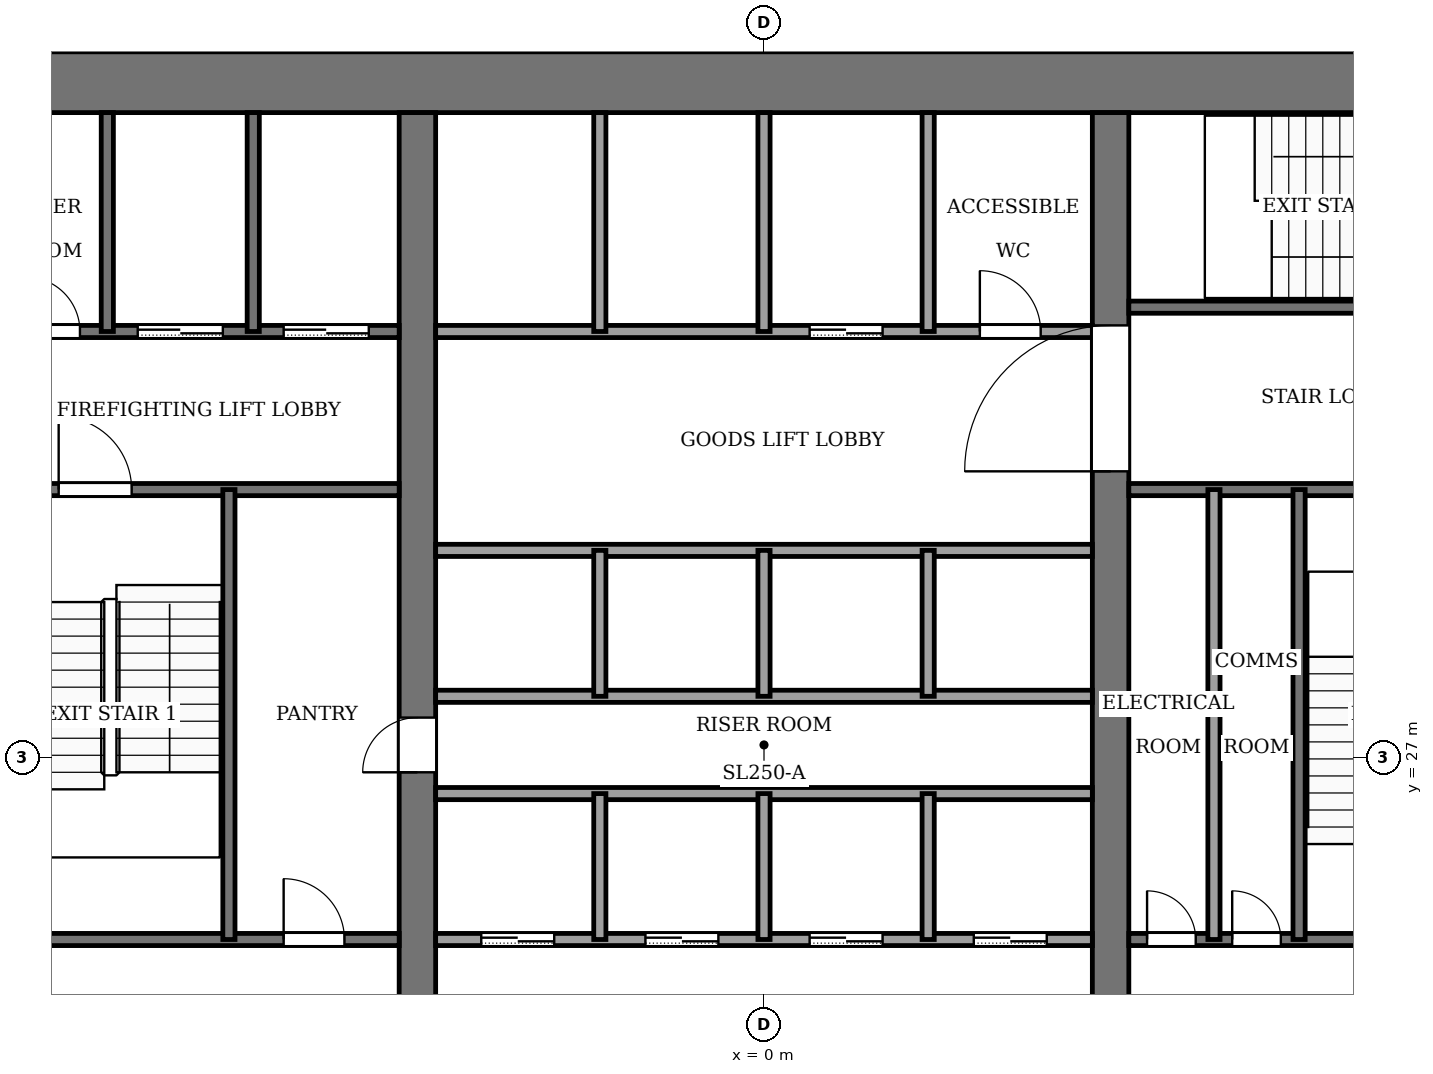
"""IFC4 building model, lengths in metres.
Left out: names, types, materials, properties, quantities, classifications, styles, units other than length and angle.
Written with IfcOpenShell. Run it as: python <this file> out.ifc"""

import sys

from ifc_helpers import new_model, si_unit, direction, frame, frame_2d, origin, place, context, subcontext, project, spatial, rectangle, extrude, element, fill, save


model = new_model("IFC4")
c1 = context("Model", 3, precision=1e-05, world=origin(), true_north=direction((0.0, 1.0)))
c2 = subcontext(c1, "Body", "Model", "MODEL_VIEW")
j1 = project(units=[si_unit("LENGTHUNIT", "METRE"), si_unit("PLANEANGLEUNIT", "RADIAN")], contexts=[c1])
p1 = place(None, origin())
s1 = spatial("IfcSite", under=j1, at=p1, CompositionType="ELEMENT")
p2 = place(p1, origin())
s2 = spatial("IfcBuilding", under=s1, at=p2, CompositionType="ELEMENT")
p3 = place(p2, frame((0.0, 0.0, 138.0)))
s3 = spatial("IfcBuildingStorey", under=s2, at=p3, CompositionType="ELEMENT", Elevation=138.0)
p4 = place(p3, frame((-13.6, 38.1, -0.13), z_axis=(0.0, 0.0, 1.0), x_axis=(1.0, 0.0, 0.0)))
e1 = element("IfcWall", 1, at=p4, inside=s3, PredefinedType="SHEAR", context=c2, shape_type="SweptSolid", body=[
    extrude(rectangle(XDim=27.2, YDim=1.0, at=frame_2d((13.6, 0.0))), origin(), (0.0, 0.0, 1.0), 4.0),
])
p5 = place(p3, frame((-5.7, 18.4, -0.13), z_axis=(0.0, 0.0, 1.0), x_axis=(0.0, 1.0, 0.0)))
e2 = element("IfcWall", 2, at=p5, inside=s3, PredefinedType="SHEAR", context=c2, shape_type="SweptSolid", body=[
    extrude(rectangle(XDim=19.2, YDim=0.6, at=frame_2d((9.6, 0.0))), origin(), (0.0, 0.0, 1.0), 4.0),
])
p6 = place(p5, frame((8.35, 0.0, 0.13)))
e3 = element("IfcOpeningElement", 3, at=p6, cuts=e2, PredefinedType="OPENING", context=c2, shape_type="SweptSolid", body=[
    extrude(rectangle(XDim=0.9, YDim=2.1, at=frame_2d((0.45, 1.05))), frame((0.0, 0.31, 0.0), z_axis=(0.0, -1.0, 0.0), x_axis=(1.0, 0.0, 0.0)), (0.0, 0.0, 1.0), 0.62),
])
p7 = place(p3, frame((5.7, 18.4, -0.13), z_axis=(0.0, 0.0, 1.0), x_axis=(0.0, 1.0, 0.0)))
e4 = element("IfcWall", 4, at=p7, inside=s3, PredefinedType="SHEAR", context=c2, shape_type="SweptSolid", body=[
    extrude(rectangle(XDim=19.2, YDim=0.6, at=frame_2d((9.6, 0.0))), origin(), (0.0, 0.0, 1.0), 4.0),
])
p8 = place(p7, frame((13.3, 0.0, 0.13)))
e5 = element("IfcOpeningElement", 5, at=p8, cuts=e4, PredefinedType="OPENING", context=c2, shape_type="SweptSolid", body=[
    extrude(rectangle(XDim=2.4, YDim=2.4, at=frame_2d((1.2, 1.2))), frame((0.0, 0.31, 0.0), z_axis=(0.0, -1.0, 0.0), x_axis=(1.0, 0.0, 0.0)), (0.0, 0.0, 1.0), 0.62),
])
p9 = place(p3, frame((-12.6, 24.0, 0.0), z_axis=(0.0, 0.0, 1.0), x_axis=(1.0, 0.0, 0.0)))
e6 = element("IfcWall", 6, at=p9, inside=s3, PredefinedType="PARTITIONING", context=c2, shape_type="SweptSolid", body=[
    extrude(rectangle(XDim=6.6, YDim=0.2, at=frame_2d((3.3, 0.0))), origin(), (0.0, 0.0, 1.0), 3.87),
])
p10 = place(p9, frame((4.7, 0.0, 0.0)))
e7 = element("IfcOpeningElement", 7, at=p10, cuts=e6, PredefinedType="OPENING", context=c2, shape_type="SweptSolid", body=[
    extrude(rectangle(XDim=1.0, YDim=2.1, at=frame_2d((0.5, 1.05))), frame((0.0, 0.11, 0.0), z_axis=(0.0, -1.0, 0.0), x_axis=(1.0, 0.0, 0.0)), (0.0, 0.0, 1.0), 0.22),
])
p11 = place(p3, frame((-5.4, 24.0, 0.0), z_axis=(0.0, 0.0, 1.0), x_axis=(1.0, 0.0, 0.0)))
e8 = element("IfcWall", 8, at=p11, inside=s3, PredefinedType="PARTITIONING", context=c2, shape_type="SweptSolid", body=[
    extrude(rectangle(XDim=10.8, YDim=0.2, at=frame_2d((5.4, 0.0))), origin(), (0.0, 0.0, 1.0), 3.87),
])
p12 = place(p11, frame((0.75, 0.0, 0.0)))
e9 = element("IfcOpeningElement", 9, at=p12, cuts=e8, PredefinedType="OPENING", context=c2, shape_type="SweptSolid", body=[
    extrude(rectangle(XDim=1.2, YDim=2.2, at=frame_2d((0.6, 1.1))), frame((0.0, 0.11, 0.0), z_axis=(0.0, -1.0, 0.0), x_axis=(1.0, 0.0, 0.0)), (0.0, 0.0, 1.0), 0.22),
])
p13 = place(p11, frame((3.45, 0.0, 0.0)))
e10 = element("IfcOpeningElement", 10, at=p13, cuts=e8, PredefinedType="OPENING", context=c2, shape_type="SweptSolid", body=[
    extrude(rectangle(XDim=1.2, YDim=2.2, at=frame_2d((0.6, 1.1))), frame((0.0, 0.11, 0.0), z_axis=(0.0, -1.0, 0.0), x_axis=(1.0, 0.0, 0.0)), (0.0, 0.0, 1.0), 0.22),
])
p14 = place(p11, frame((6.15, 0.0, 0.0)))
e11 = element("IfcOpeningElement", 11, at=p14, cuts=e8, PredefinedType="OPENING", context=c2, shape_type="SweptSolid", body=[
    extrude(rectangle(XDim=1.2, YDim=2.2, at=frame_2d((0.6, 1.1))), frame((0.0, 0.11, 0.0), z_axis=(0.0, -1.0, 0.0), x_axis=(1.0, 0.0, 0.0)), (0.0, 0.0, 1.0), 0.22),
])
p15 = place(p11, frame((8.85, 0.0, 0.0)))
e12 = element("IfcOpeningElement", 12, at=p15, cuts=e8, PredefinedType="OPENING", context=c2, shape_type="SweptSolid", body=[
    extrude(rectangle(XDim=1.2, YDim=2.2, at=frame_2d((0.6, 1.1))), frame((0.0, 0.11, 0.0), z_axis=(0.0, -1.0, 0.0), x_axis=(1.0, 0.0, 0.0)), (0.0, 0.0, 1.0), 0.22),
])
p16 = place(p3, frame((6.0, 24.0, 0.0), z_axis=(0.0, 0.0, 1.0), x_axis=(1.0, 0.0, 0.0)))
e13 = element("IfcWall", 13, at=p16, inside=s3, PredefinedType="PARTITIONING", context=c2, shape_type="SweptSolid", body=[
    extrude(rectangle(XDim=6.6, YDim=0.2, at=frame_2d((3.3, 0.0))), origin(), (0.0, 0.0, 1.0), 3.87),
])
p17 = place(p16, frame((0.3, 0.0, 0.0)))
e14 = element("IfcOpeningElement", 14, at=p17, cuts=e13, PredefinedType="OPENING", context=c2, shape_type="SweptSolid", body=[
    extrude(rectangle(XDim=0.8, YDim=2.1, at=frame_2d((0.4, 1.05))), frame((0.0, 0.11, 0.0), z_axis=(0.0, -1.0, 0.0), x_axis=(1.0, 0.0, 0.0)), (0.0, 0.0, 1.0), 0.22),
])
p18 = place(p16, frame((1.7, 0.0, 0.0)))
e15 = element("IfcOpeningElement", 15, at=p18, cuts=e13, PredefinedType="OPENING", context=c2, shape_type="SweptSolid", body=[
    extrude(rectangle(XDim=0.8, YDim=2.1, at=frame_2d((0.4, 1.05))), frame((0.0, 0.11, 0.0), z_axis=(0.0, -1.0, 0.0), x_axis=(1.0, 0.0, 0.0)), (0.0, 0.0, 1.0), 0.22),
])
p19 = place(p16, frame((4.4, 0.0, 0.0)))
e16 = element("IfcOpeningElement", 16, at=p19, cuts=e13, PredefinedType="OPENING", context=c2, shape_type="SweptSolid", body=[
    extrude(rectangle(XDim=1.2, YDim=2.2, at=frame_2d((0.6, 1.1))), frame((0.0, 0.11, 0.0), z_axis=(0.0, -1.0, 0.0), x_axis=(1.0, 0.0, 0.0)), (0.0, 0.0, 1.0), 0.22),
])
for number, where, z_axis, x_axis in (
    (17, (-5.4, 26.4, 0.0), (0.0, 0.0, 1.0), (1.0, 0.0, 0.0)),
    (18, (-5.4, 28.0, 0.0), (0.0, 0.0, 1.0), (1.0, 0.0, 0.0)),
    (19, (-5.4, 30.4, 0.0), (0.0, 0.0, 1.0), (1.0, 0.0, 0.0)),
):
    element("IfcWall", number, at=place(p3, frame(where, z_axis=z_axis, x_axis=x_axis)), inside=s3, PredefinedType="PARTITIONING", context=c2, shape_type="SweptSolid", body=[
        extrude(rectangle(XDim=10.8, YDim=0.2, at=frame_2d((5.4, 0.0))), origin(), (0.0, 0.0, 1.0), 3.87),
    ])
p20 = place(p3, frame((-12.6, 31.4, 0.0), z_axis=(0.0, 0.0, 1.0), x_axis=(1.0, 0.0, 0.0)))
e20 = element("IfcWall", 20, at=p20, inside=s3, PredefinedType="PARTITIONING", context=c2, shape_type="SweptSolid", body=[
    extrude(rectangle(XDim=6.6, YDim=0.2, at=frame_2d((3.3, 0.0))), origin(), (0.0, 0.0, 1.0), 3.87),
])
p21 = place(p20, frame((1.0, 0.0, 0.0)))
e21 = element("IfcOpeningElement", 21, at=p21, cuts=e20, PredefinedType="OPENING", context=c2, shape_type="SweptSolid", body=[
    extrude(rectangle(XDim=1.2, YDim=2.2, at=frame_2d((0.6, 1.1))), frame((0.0, 0.11, 0.0), z_axis=(0.0, -1.0, 0.0), x_axis=(1.0, 0.0, 0.0)), (0.0, 0.0, 1.0), 0.22),
])
p22 = place(p3, frame((6.0, 31.4, 0.0), z_axis=(0.0, 0.0, 1.0), x_axis=(1.0, 0.0, 0.0)))
e22 = element("IfcWall", 22, at=p22, inside=s3, PredefinedType="PARTITIONING", context=c2, shape_type="SweptSolid", body=[
    extrude(rectangle(XDim=6.6, YDim=0.2, at=frame_2d((3.3, 0.0))), origin(), (0.0, 0.0, 1.0), 3.87),
])
p23 = place(p3, frame((-12.6, 34.0, 0.0), z_axis=(0.0, 0.0, 1.0), x_axis=(1.0, 0.0, 0.0)))
e23 = element("IfcWall", 23, at=p23, inside=s3, PredefinedType="PARTITIONING", context=c2, shape_type="SweptSolid", body=[
    extrude(rectangle(XDim=6.6, YDim=0.2, at=frame_2d((3.3, 0.0))), origin(), (0.0, 0.0, 1.0), 3.87),
])
p24 = place(p23, frame((4.7, 0.0, 0.0)))
e24 = element("IfcOpeningElement", 24, at=p24, cuts=e23, PredefinedType="OPENING", context=c2, shape_type="SweptSolid", body=[
    extrude(rectangle(XDim=1.4, YDim=2.2, at=frame_2d((0.7, 1.1))), frame((0.0, 0.11, 0.0), z_axis=(0.0, -1.0, 0.0), x_axis=(1.0, 0.0, 0.0)), (0.0, 0.0, 1.0), 0.22),
])
p25 = place(p23, frame((2.3, 0.0, 0.0)))
e25 = element("IfcOpeningElement", 25, at=p25, cuts=e23, PredefinedType="OPENING", context=c2, shape_type="SweptSolid", body=[
    extrude(rectangle(XDim=1.4, YDim=2.2, at=frame_2d((0.7, 1.1))), frame((0.0, 0.11, 0.0), z_axis=(0.0, -1.0, 0.0), x_axis=(1.0, 0.0, 0.0)), (0.0, 0.0, 1.0), 0.22),
])
p26 = place(p23, frame((0.45, 0.0, 0.0)))
e26 = element("IfcOpeningElement", 26, at=p26, cuts=e23, PredefinedType="OPENING", context=c2, shape_type="SweptSolid", body=[
    extrude(rectangle(XDim=0.9, YDim=2.1, at=frame_2d((0.45, 1.05))), frame((0.0, 0.11, 0.0), z_axis=(0.0, -1.0, 0.0), x_axis=(1.0, 0.0, 0.0)), (0.0, 0.0, 1.0), 0.22),
])
p27 = place(p3, frame((-5.4, 34.0, 0.0), z_axis=(0.0, 0.0, 1.0), x_axis=(1.0, 0.0, 0.0)))
e27 = element("IfcWall", 27, at=p27, inside=s3, PredefinedType="PARTITIONING", context=c2, shape_type="SweptSolid", body=[
    extrude(rectangle(XDim=10.8, YDim=0.2, at=frame_2d((5.4, 0.0))), origin(), (0.0, 0.0, 1.0), 3.87),
])
p28 = place(p27, frame((6.15, 0.0, 0.0)))
e28 = element("IfcOpeningElement", 28, at=p28, cuts=e27, PredefinedType="OPENING", context=c2, shape_type="SweptSolid", body=[
    extrude(rectangle(XDim=1.2, YDim=2.2, at=frame_2d((0.6, 1.1))), frame((0.0, 0.11, 0.0), z_axis=(0.0, -1.0, 0.0), x_axis=(1.0, 0.0, 0.0)), (0.0, 0.0, 1.0), 0.22),
])
p29 = place(p27, frame((8.95, 0.0, 0.0)))
e29 = element("IfcOpeningElement", 29, at=p29, cuts=e27, PredefinedType="OPENING", context=c2, shape_type="SweptSolid", body=[
    extrude(rectangle(XDim=1.0, YDim=2.1, at=frame_2d((0.5, 1.05))), frame((0.0, 0.11, 0.0), z_axis=(0.0, -1.0, 0.0), x_axis=(1.0, 0.0, 0.0)), (0.0, 0.0, 1.0), 0.22),
])
p30 = place(p3, frame((6.0, 34.4, 0.0), z_axis=(0.0, 0.0, 1.0), x_axis=(1.0, 0.0, 0.0)))
e30 = element("IfcWall", 30, at=p30, inside=s3, PredefinedType="PARTITIONING", context=c2, shape_type="SweptSolid", body=[
    extrude(rectangle(XDim=6.6, YDim=0.2, at=frame_2d((3.3, 0.0))), origin(), (0.0, 0.0, 1.0), 3.87),
])
p31 = place(p30, frame((4.8, 0.0, 0.0)))
e31 = element("IfcOpeningElement", 31, at=p31, cuts=e30, PredefinedType="OPENING", context=c2, shape_type="SweptSolid", body=[
    extrude(rectangle(XDim=1.2, YDim=2.2, at=frame_2d((0.6, 1.1))), frame((0.0, 0.11, 0.0), z_axis=(0.0, -1.0, 0.0), x_axis=(1.0, 0.0, 0.0)), (0.0, 0.0, 1.0), 0.22),
])
p32 = place(p3, frame((-10.8, 34.0, 0.0), z_axis=(0.0, 0.0, 1.0), x_axis=(0.0, 1.0, 0.0)))
e32 = element("IfcWall", 32, at=p32, inside=s3, PredefinedType="PARTITIONING", context=c2, shape_type="SweptSolid", body=[
    extrude(rectangle(XDim=3.6, YDim=0.2, at=frame_2d((1.8, 0.0))), origin(), (0.0, 0.0, 1.0), 3.87),
])
p33 = place(p3, frame((-8.8, 24.0, 0.0), z_axis=(0.0, 0.0, 1.0), x_axis=(0.0, 1.0, 0.0)))
e33 = element("IfcWall", 33, at=p33, inside=s3, PredefinedType="PARTITIONING", context=c2, shape_type="SweptSolid", body=[
    extrude(rectangle(XDim=7.4, YDim=0.2, at=frame_2d((3.7, 0.0))), origin(), (0.0, 0.0, 1.0), 3.87),
])
p34 = place(p3, frame((-8.4, 34.0, 0.0), z_axis=(0.0, 0.0, 1.0), x_axis=(0.0, 1.0, 0.0)))
e34 = element("IfcWall", 34, at=p34, inside=s3, PredefinedType="PARTITIONING", context=c2, shape_type="SweptSolid", body=[
    extrude(rectangle(XDim=3.6, YDim=0.2, at=frame_2d((1.8, 0.0))), origin(), (0.0, 0.0, 1.0), 3.87),
])
for number, where, z_axis, x_axis in (
    (35, (-2.7, 24.0, 0.0), (0.0, 0.0, 1.0), (0.0, 1.0, 0.0)),
    (36, (-2.7, 28.0, 0.0), (0.0, 0.0, 1.0), (0.0, 1.0, 0.0)),
):
    element("IfcWall", number, at=place(p3, frame(where, z_axis=z_axis, x_axis=x_axis)), inside=s3, PredefinedType="PARTITIONING", context=c2, shape_type="SweptSolid", body=[
        extrude(rectangle(XDim=2.4, YDim=0.2, at=frame_2d((1.2, 0.0))), origin(), (0.0, 0.0, 1.0), 3.87),
    ])
p35 = place(p3, frame((-2.7, 34.0, 0.0), z_axis=(0.0, 0.0, 1.0), x_axis=(0.0, 1.0, 0.0)))
e37 = element("IfcWall", 37, at=p35, inside=s3, PredefinedType="PARTITIONING", context=c2, shape_type="SweptSolid", body=[
    extrude(rectangle(XDim=3.6, YDim=0.2, at=frame_2d((1.8, 0.0))), origin(), (0.0, 0.0, 1.0), 3.87),
])
for number, where, z_axis, x_axis in (
    (38, (0.0, 24.0, 0.0), (0.0, 0.0, 1.0), (0.0, 1.0, 0.0)),
    (39, (0.0, 28.0, 0.0), (0.0, 0.0, 1.0), (0.0, 1.0, 0.0)),
):
    element("IfcWall", number, at=place(p3, frame(where, z_axis=z_axis, x_axis=x_axis)), inside=s3, PredefinedType="PARTITIONING", context=c2, shape_type="SweptSolid", body=[
        extrude(rectangle(XDim=2.4, YDim=0.2, at=frame_2d((1.2, 0.0))), origin(), (0.0, 0.0, 1.0), 3.87),
    ])
p36 = place(p3, frame((0.0, 34.0, 0.0), z_axis=(0.0, 0.0, 1.0), x_axis=(0.0, 1.0, 0.0)))
e40 = element("IfcWall", 40, at=p36, inside=s3, PredefinedType="PARTITIONING", context=c2, shape_type="SweptSolid", body=[
    extrude(rectangle(XDim=3.6, YDim=0.2, at=frame_2d((1.8, 0.0))), origin(), (0.0, 0.0, 1.0), 3.87),
])
for number, where, z_axis, x_axis in (
    (41, (2.7, 24.0, 0.0), (0.0, 0.0, 1.0), (0.0, 1.0, 0.0)),
    (42, (2.7, 28.0, 0.0), (0.0, 0.0, 1.0), (0.0, 1.0, 0.0)),
):
    element("IfcWall", number, at=place(p3, frame(where, z_axis=z_axis, x_axis=x_axis)), inside=s3, PredefinedType="PARTITIONING", context=c2, shape_type="SweptSolid", body=[
        extrude(rectangle(XDim=2.4, YDim=0.2, at=frame_2d((1.2, 0.0))), origin(), (0.0, 0.0, 1.0), 3.87),
    ])
p37 = place(p3, frame((2.7, 34.0, 0.0), z_axis=(0.0, 0.0, 1.0), x_axis=(0.0, 1.0, 0.0)))
e43 = element("IfcWall", 43, at=p37, inside=s3, PredefinedType="PARTITIONING", context=c2, shape_type="SweptSolid", body=[
    extrude(rectangle(XDim=3.6, YDim=0.2, at=frame_2d((1.8, 0.0))), origin(), (0.0, 0.0, 1.0), 3.87),
])
for number, where, z_axis, x_axis in (
    (44, (7.4, 24.0, 0.0), (0.0, 0.0, 1.0), (0.0, 1.0, 0.0)),
    (45, (8.8, 24.0, 0.0), (0.0, 0.0, 1.0), (0.0, 1.0, 0.0)),
):
    element("IfcWall", number, at=place(p3, frame(where, z_axis=z_axis, x_axis=x_axis)), inside=s3, PredefinedType="PARTITIONING", context=c2, shape_type="SweptSolid", body=[
        extrude(rectangle(XDim=7.4, YDim=0.2, at=frame_2d((3.7, 0.0))), origin(), (0.0, 0.0, 1.0), 3.87),
    ])
p38 = place(p12, origin())
e46 = element("IfcDoor", 46, at=p38, inside=s3, OperationType="SLIDING_TO_LEFT", PredefinedType="DOOR", context=c2, shape_type="SweptSolid", body=[
    extrude(rectangle(XDim=1.2, YDim=2.2, at=frame_2d((0.6, 1.1))), frame((0.0, 0.025, 0.0), z_axis=(0.0, -1.0, 0.0), x_axis=(1.0, 0.0, 0.0)), (0.0, 0.0, 1.0), 0.05),
])
fill(e9, e46)
p39 = place(p13, origin())
e47 = element("IfcDoor", 47, at=p39, inside=s3, OperationType="SLIDING_TO_LEFT", PredefinedType="DOOR", context=c2, shape_type="SweptSolid", body=[
    extrude(rectangle(XDim=1.2, YDim=2.2, at=frame_2d((0.6, 1.1))), frame((0.0, 0.025, 0.0), z_axis=(0.0, -1.0, 0.0), x_axis=(1.0, 0.0, 0.0)), (0.0, 0.0, 1.0), 0.05),
])
fill(e10, e47)
p40 = place(p14, origin())
e48 = element("IfcDoor", 48, at=p40, inside=s3, OperationType="SLIDING_TO_LEFT", PredefinedType="DOOR", context=c2, shape_type="SweptSolid", body=[
    extrude(rectangle(XDim=1.2, YDim=2.2, at=frame_2d((0.6, 1.1))), frame((0.0, 0.025, 0.0), z_axis=(0.0, -1.0, 0.0), x_axis=(1.0, 0.0, 0.0)), (0.0, 0.0, 1.0), 0.05),
])
fill(e11, e48)
p41 = place(p15, origin())
e49 = element("IfcDoor", 49, at=p41, inside=s3, OperationType="SLIDING_TO_LEFT", PredefinedType="DOOR", context=c2, shape_type="SweptSolid", body=[
    extrude(rectangle(XDim=1.2, YDim=2.2, at=frame_2d((0.6, 1.1))), frame((0.0, 0.025, 0.0), z_axis=(0.0, -1.0, 0.0), x_axis=(1.0, 0.0, 0.0)), (0.0, 0.0, 1.0), 0.05),
])
fill(e12, e49)
p42 = place(p28, origin())
e50 = element("IfcDoor", 50, at=p42, inside=s3, OperationType="SLIDING_TO_LEFT", PredefinedType="DOOR", context=c2, shape_type="SweptSolid", body=[
    extrude(rectangle(XDim=1.2, YDim=2.2, at=frame_2d((0.6, 1.1))), frame((0.0, 0.025, 0.0), z_axis=(0.0, -1.0, 0.0), x_axis=(1.0, 0.0, 0.0)), (0.0, 0.0, 1.0), 0.05),
])
fill(e28, e50)
p43 = place(p24, origin())
e51 = element("IfcDoor", 51, at=p43, inside=s3, OperationType="SLIDING_TO_LEFT", PredefinedType="DOOR", context=c2, shape_type="SweptSolid", body=[
    extrude(rectangle(XDim=1.4, YDim=2.2, at=frame_2d((0.7, 1.1))), frame((0.0, 0.025, 0.0), z_axis=(0.0, -1.0, 0.0), x_axis=(1.0, 0.0, 0.0)), (0.0, 0.0, 1.0), 0.05),
])
fill(e24, e51)
p44 = place(p25, origin())
e52 = element("IfcDoor", 52, at=p44, inside=s3, OperationType="SLIDING_TO_LEFT", PredefinedType="DOOR", context=c2, shape_type="SweptSolid", body=[
    extrude(rectangle(XDim=1.4, YDim=2.2, at=frame_2d((0.7, 1.1))), frame((0.0, 0.025, 0.0), z_axis=(0.0, -1.0, 0.0), x_axis=(1.0, 0.0, 0.0)), (0.0, 0.0, 1.0), 0.05),
])
fill(e25, e52)
p45 = place(p26, origin())
e53 = element("IfcDoor", 53, at=p45, inside=s3, OperationType="SINGLE_SWING_RIGHT", PredefinedType="DOOR", context=c2, shape_type="SweptSolid", body=[
    extrude(rectangle(XDim=0.9, YDim=2.1, at=frame_2d((0.45, 1.05))), frame((0.0, 0.025, 0.0), z_axis=(0.0, -1.0, 0.0), x_axis=(1.0, 0.0, 0.0)), (0.0, 0.0, 1.0), 0.05),
])
fill(e26, e53)
p46 = place(p10, origin())
e54 = element("IfcDoor", 54, at=p46, inside=s3, OperationType="SINGLE_SWING_RIGHT", PredefinedType="DOOR", context=c2, shape_type="SweptSolid", body=[
    extrude(rectangle(XDim=1.0, YDim=2.1, at=frame_2d((0.5, 1.05))), frame((0.0, 0.025, 0.0), z_axis=(0.0, -1.0, 0.0), x_axis=(1.0, 0.0, 0.0)), (0.0, 0.0, 1.0), 0.05),
])
fill(e7, e54)
p47 = place(p17, origin())
e55 = element("IfcDoor", 55, at=p47, inside=s3, OperationType="SINGLE_SWING_RIGHT", PredefinedType="DOOR", context=c2, shape_type="SweptSolid", body=[
    extrude(rectangle(XDim=0.8, YDim=2.1, at=frame_2d((0.4, 1.05))), frame((0.0, 0.025, 0.0), z_axis=(0.0, -1.0, 0.0), x_axis=(1.0, 0.0, 0.0)), (0.0, 0.0, 1.0), 0.05),
])
fill(e14, e55)
p48 = place(p18, origin())
e56 = element("IfcDoor", 56, at=p48, inside=s3, OperationType="SINGLE_SWING_LEFT", PredefinedType="DOOR", context=c2, shape_type="SweptSolid", body=[
    extrude(rectangle(XDim=0.8, YDim=2.1, at=frame_2d((0.4, 1.05))), frame((0.0, 0.025, 0.0), z_axis=(0.0, -1.0, 0.0), x_axis=(1.0, 0.0, 0.0)), (0.0, 0.0, 1.0), 0.05),
])
fill(e15, e56)
p49 = place(p29, origin())
e57 = element("IfcDoor", 57, at=p49, inside=s3, OperationType="SINGLE_SWING_LEFT", PredefinedType="DOOR", context=c2, shape_type="SweptSolid", body=[
    extrude(rectangle(XDim=1.0, YDim=2.1, at=frame_2d((0.5, 1.05))), frame((0.0, 0.025, 0.0), z_axis=(0.0, -1.0, 0.0), x_axis=(1.0, 0.0, 0.0)), (0.0, 0.0, 1.0), 0.05),
])
fill(e29, e57)
p50 = place(p6, origin())
e58 = element("IfcDoor", 58, at=p50, inside=s3, OperationType="SINGLE_SWING_LEFT", PredefinedType="DOOR", context=c2, shape_type="SweptSolid", body=[
    extrude(rectangle(XDim=0.9, YDim=2.1, at=frame_2d((0.45, 1.05))), frame((0.0, 0.025, 0.0), z_axis=(0.0, -1.0, 0.0), x_axis=(1.0, 0.0, 0.0)), (0.0, 0.0, 1.0), 0.05),
])
fill(e3, e58)
p51 = place(p21, origin())
e59 = element("IfcDoor", 59, at=p51, inside=s3, OperationType="SINGLE_SWING_LEFT", PredefinedType="DOOR", context=c2, shape_type="SweptSolid", body=[
    extrude(rectangle(XDim=1.2, YDim=2.2, at=frame_2d((0.6, 1.1))), frame((0.0, 0.025, 0.0), z_axis=(0.0, -1.0, 0.0), x_axis=(1.0, 0.0, 0.0)), (0.0, 0.0, 1.0), 0.05),
])
fill(e21, e59)
p52 = place(p8, origin())
e60 = element("IfcDoor", 60, at=p52, inside=s3, OperationType="DOUBLE_DOOR_SINGLE_SWING", PredefinedType="DOOR", context=c2, shape_type="SweptSolid", body=[
    extrude(rectangle(XDim=2.4, YDim=2.4, at=frame_2d((1.2, 1.2))), frame((0.0, 0.025, 0.0), z_axis=(0.0, -1.0, 0.0), x_axis=(1.0, 0.0, 0.0)), (0.0, 0.0, 1.0), 0.05),
])
fill(e5, e60)
save(model, sys.argv[1])
